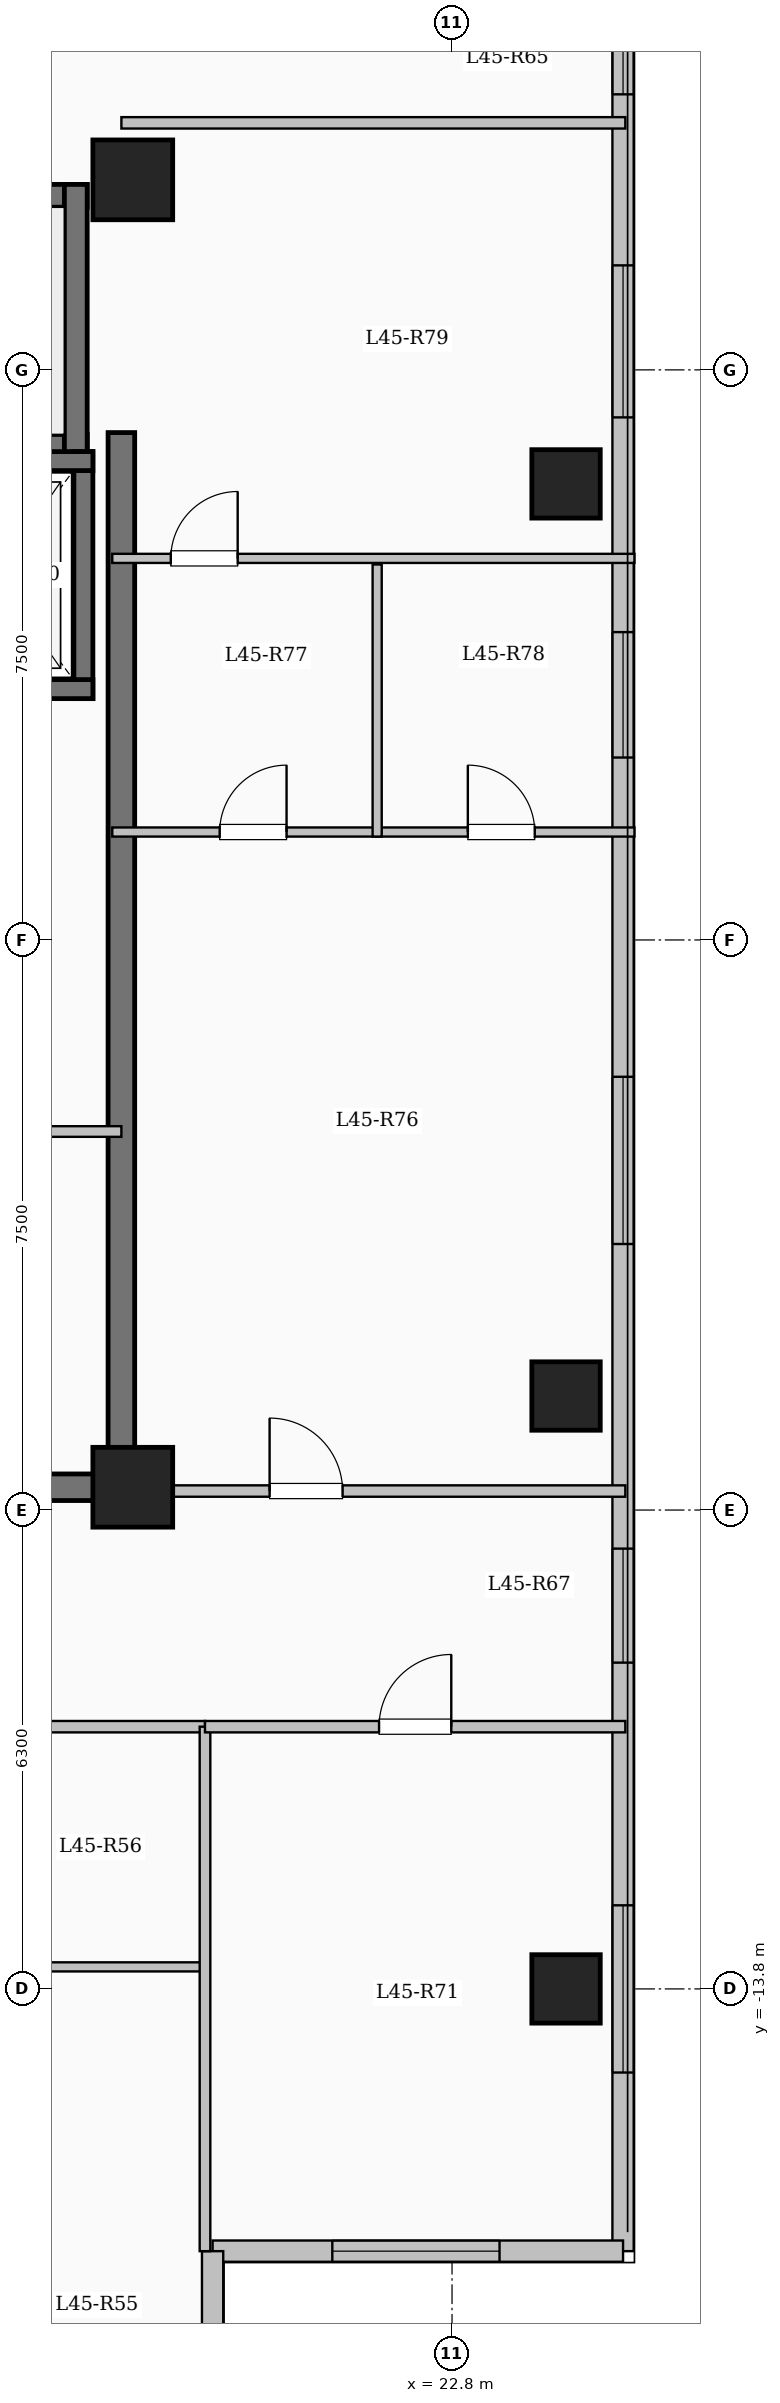
"""IFC4 building model, lengths in metres.
Left out: names, types, materials, properties, quantities, classifications, styles, units other than length and angle.
Written with IfcOpenShell. Run it as: python <this file> out.ifc"""

import sys

from ifc_helpers import new_model, si_unit, direction, frame, frame_2d, origin, origin_2d, place, context, subcontext, project, spatial, rectangle, extrude, element, fill, save


model = new_model("IFC4")
c1 = context("Model", 3, precision=1e-05, world=origin(), true_north=direction((0.0, 1.0)))
c2 = subcontext(c1, "Body", "Model", "MODEL_VIEW")
j1 = project(units=[si_unit("LENGTHUNIT", "METRE"), si_unit("PLANEANGLEUNIT", "RADIAN")], contexts=[c1])
p1 = place(None, origin())
s1 = spatial("IfcSite", under=j1, at=p1, CompositionType="ELEMENT")
p2 = place(p1, origin())
s2 = spatial("IfcBuilding", under=s1, at=p2, CompositionType="ELEMENT")
p3 = place(p2, frame((0.0, 0.0, 166.1)))
s3 = spatial("IfcBuildingStorey", under=s2, at=p3, CompositionType="ELEMENT", Elevation=166.1)
for number, where, z_axis, x_axis in (
    (1, (18.6, -7.2, 0.0), (0.0, 0.0, 1.0), (1.0, 0.0, 0.0)),
    (2, (18.6, 10.0, 0.0), (0.0, 0.0, 1.0), (1.0, 0.0, 0.0)),
):
    element("IfcColumn", number, at=place(p3, frame(where, z_axis=z_axis, x_axis=x_axis)), inside=s3, PredefinedType="COLUMN", context=c2, shape_type="SweptSolid", body=[
        extrude(rectangle(XDim=1.05, YDim=1.05, at=origin_2d()), origin(), (0.0, 0.0, 1.0), 3.35),
    ])
for number, where, z_axis, x_axis in (
    (3, (24.3, -13.8, 0.0), (0.0, 0.0, 1.0), (1.0, 0.0, 0.0)),
    (4, (24.3, -6.0, 0.0), (0.0, 0.0, 1.0), (1.0, 0.0, 0.0)),
    (5, (24.3, 6.0, 0.0), (0.0, 0.0, 1.0), (1.0, 0.0, 0.0)),
):
    element("IfcColumn", number, at=place(p3, frame(where, z_axis=z_axis, x_axis=x_axis)), inside=s3, PredefinedType="COLUMN", context=c2, shape_type="SweptSolid", body=[
        extrude(rectangle(XDim=0.9, YDim=0.9, at=origin_2d()), origin(), (0.0, 0.0, 1.0), 3.35),
    ])
p4 = place(p3, frame((25.05, 17.25, 0.0), z_axis=(0.0, 0.0, 1.0), x_axis=(0.0, -1.0, 0.0)))
e6 = element("IfcWall", 6, at=p4, inside=s3, PredefinedType="SOLIDWALL", context=c2, shape_type="SweptSolid", body=[
    extrude(rectangle(XDim=34.5, YDim=0.28, at=frame_2d((17.25, 0.0))), origin(), (0.0, 0.0, 1.0), 3.1),
])
p5 = place(p4, frame((1.375, 0.0, 0.9)))
e7 = element("IfcOpeningElement", 7, at=p5, cuts=e6, PredefinedType="OPENING", context=c2, shape_type="SweptSolid", body=[
    extrude(rectangle(XDim=2.0, YDim=1.7, at=frame_2d((1.0, 0.85))), frame((0.0, 0.15, 0.0), z_axis=(0.0, -1.0, 0.0), x_axis=(1.0, 0.0, 0.0)), (0.0, 0.0, 1.0), 0.3),
])
p6 = place(p4, frame((5.125, 0.0, 0.95)))
e8 = element("IfcOpeningElement", 8, at=p6, cuts=e6, PredefinedType="OPENING", context=c2, shape_type="SweptSolid", body=[
    extrude(rectangle(XDim=1.0, YDim=1.5, at=frame_2d((0.5, 0.75))), frame((0.0, 0.15, 0.0), z_axis=(0.0, -1.0, 0.0), x_axis=(1.0, 0.0, 0.0)), (0.0, 0.0, 1.0), 0.3),
])
p7 = place(p4, frame((8.375, 0.0, 0.9)))
e9 = element("IfcOpeningElement", 9, at=p7, cuts=e6, PredefinedType="OPENING", context=c2, shape_type="SweptSolid", body=[
    extrude(rectangle(XDim=2.0, YDim=1.7, at=frame_2d((1.0, 0.85))), frame((0.0, 0.15, 0.0), z_axis=(0.0, -1.0, 0.0), x_axis=(1.0, 0.0, 0.0)), (0.0, 0.0, 1.0), 0.3),
])
p8 = place(p4, frame((13.2, 0.0, 0.9)))
e10 = element("IfcOpeningElement", 10, at=p8, cuts=e6, PredefinedType="OPENING", context=c2, shape_type="SweptSolid", body=[
    extrude(rectangle(XDim=1.65, YDim=1.6, at=frame_2d((0.825, 0.8))), frame((0.0, 0.15, 0.0), z_axis=(0.0, -1.0, 0.0), x_axis=(1.0, 0.0, 0.0)), (0.0, 0.0, 1.0), 0.3),
])
p9 = place(p4, frame((19.05, 0.0, 0.9)))
e11 = element("IfcOpeningElement", 11, at=p9, cuts=e6, PredefinedType="OPENING", context=c2, shape_type="SweptSolid", body=[
    extrude(rectangle(XDim=2.2, YDim=1.75, at=frame_2d((1.1, 0.875))), frame((0.0, 0.15, 0.0), z_axis=(0.0, -1.0, 0.0), x_axis=(1.0, 0.0, 0.0)), (0.0, 0.0, 1.0), 0.3),
])
p10 = place(p4, frame((25.258, 0.0, 0.9)))
e12 = element("IfcOpeningElement", 12, at=p10, cuts=e6, PredefinedType="OPENING", context=c2, shape_type="SweptSolid", body=[
    extrude(rectangle(XDim=1.5, YDim=1.65, at=frame_2d((0.75, 0.825))), frame((0.0, 0.15, 0.0), z_axis=(0.0, -1.0, 0.0), x_axis=(1.0, 0.0, 0.0)), (0.0, 0.0, 1.0), 0.3),
])
p11 = place(p4, frame((29.95, 0.0, 0.9)))
e13 = element("IfcOpeningElement", 13, at=p11, cuts=e6, PredefinedType="OPENING", context=c2, shape_type="SweptSolid", body=[
    extrude(rectangle(XDim=2.2, YDim=1.75, at=frame_2d((1.1, 0.875))), frame((0.0, 0.15, 0.0), z_axis=(0.0, -1.0, 0.0), x_axis=(1.0, 0.0, 0.0)), (0.0, 0.0, 1.0), 0.3),
])
p12 = place(p3, frame((25.05, -17.25, 0.0), z_axis=(0.0, 0.0, 1.0), x_axis=(-1.0, 0.0, 0.0)))
e14 = element("IfcWall", 14, at=p12, inside=s3, PredefinedType="SOLIDWALL", context=c2, shape_type="SweptSolid", body=[
    extrude(rectangle(XDim=5.4, YDim=0.28, at=frame_2d((2.7, 0.0))), origin(), (0.0, 0.0, 1.0), 3.1),
])
p13 = place(p12, frame((1.625, 0.0, 0.9)))
e15 = element("IfcOpeningElement", 15, at=p13, cuts=e14, PredefinedType="OPENING", context=c2, shape_type="SweptSolid", body=[
    extrude(rectangle(XDim=2.2, YDim=1.75, at=frame_2d((1.1, 0.875))), frame((0.0, 0.15, 0.0), z_axis=(0.0, -1.0, 0.0), x_axis=(1.0, 0.0, 0.0)), (0.0, 0.0, 1.0), 0.3),
])
p14 = place(p3, frame((19.65, -17.25, 0.0), z_axis=(0.0, 0.0, 1.0), x_axis=(0.0, -1.0, 0.0)))
e16 = element("IfcWall", 16, at=p14, inside=s3, PredefinedType="SOLIDWALL", context=c2, shape_type="SweptSolid", body=[
    extrude(rectangle(XDim=3.9, YDim=0.28, at=frame_2d((1.95, 0.0))), origin(), (0.0, 0.0, 1.0), 3.1),
])
p15 = place(p14, frame((1.107, 0.0, 0.9)))
e17 = element("IfcOpeningElement", 17, at=p15, cuts=e16, PredefinedType="OPENING", context=c2, shape_type="SweptSolid", body=[
    extrude(rectangle(XDim=1.65, YDim=1.6, at=frame_2d((0.825, 0.8))), frame((0.0, 0.15, 0.0), z_axis=(0.0, -1.0, 0.0), x_axis=(1.0, 0.0, 0.0)), (0.0, 0.0, 1.0), 0.3),
])
p16 = place(p3, frame((10.0, 9.79, 0.0), z_axis=(0.0, 0.0, 1.0), x_axis=(1.0, 0.0, 0.0)))
e18 = element("IfcWall", 18, at=p16, inside=s3, PredefinedType="SHEAR", context=c2, shape_type="SweptSolid", body=[
    extrude(rectangle(XDim=8.0, YDim=0.3, at=frame_2d((4.0, 0.0))), origin(), (0.0, 0.0, 1.0), 3.35),
])
p17 = place(p3, frame((10.0, 6.5, 0.0), z_axis=(0.0, 0.0, 1.0), x_axis=(1.0, 0.0, 0.0)))
e19 = element("IfcWall", 19, at=p17, inside=s3, PredefinedType="SHEAR", context=c2, shape_type="SweptSolid", body=[
    extrude(rectangle(XDim=8.0, YDim=0.3, at=frame_2d((4.0, 0.0))), origin(), (0.0, 0.0, 1.0), 3.35),
])
p18 = place(p17, frame((0.55, 0.0, 0.0)))
e20 = element("IfcOpeningElement", 20, at=p18, cuts=e19, PredefinedType="OPENING", context=c2, shape_type="SweptSolid", body=[
    extrude(rectangle(XDim=1.0, YDim=2.15, at=frame_2d((0.5, 1.075))), frame((0.0, 0.16, 0.0), z_axis=(0.0, -1.0, 0.0), x_axis=(1.0, 0.0, 0.0)), (0.0, 0.0, 1.0), 0.32),
])
p19 = place(p3, frame((17.85, 6.35, 0.0), z_axis=(0.0, 0.0, 1.0), x_axis=(0.0, 1.0, 0.0)))
e21 = element("IfcWall", 21, at=p19, inside=s3, PredefinedType="SHEAR", context=c2, shape_type="SweptSolid", body=[
    extrude(rectangle(XDim=3.59, YDim=0.3, at=frame_2d((1.795, 0.0))), origin(), (0.0, 0.0, 1.0), 3.35),
])
p20 = place(p3, frame((17.95, 3.175, 0.0), z_axis=(0.0, 0.0, 1.0), x_axis=(0.0, 1.0, 0.0)))
e22 = element("IfcWall", 22, at=p20, inside=s3, PredefinedType="SHEAR", context=c2, shape_type="SweptSolid", body=[
    extrude(rectangle(XDim=3.25, YDim=0.25, at=frame_2d((1.625, 0.0))), origin(), (0.0, 0.0, 1.0), 3.35),
])
for number, where, z_axis, x_axis in (
    (23, (15.525, 3.3, 0.0), (0.0, 0.0, 1.0), (1.0, 0.0, 0.0)),
    (24, (15.525, 6.3, 0.0), (0.0, 0.0, 1.0), (1.0, 0.0, 0.0)),
):
    element("IfcWall", number, at=place(p3, frame(where, z_axis=z_axis, x_axis=x_axis)), inside=s3, PredefinedType="SHEAR", context=c2, shape_type="SweptSolid", body=[
        extrude(rectangle(XDim=2.55, YDim=0.25, at=frame_2d((1.275, 0.0))), origin(), (0.0, 0.0, 1.0), 3.35),
    ])
p21 = place(p3, frame((18.45, -7.375, 0.0), z_axis=(0.0, 0.0, 1.0), x_axis=(0.0, 1.0, 0.0)))
e25 = element("IfcWall", 25, at=p21, inside=s3, PredefinedType="SHEAR", context=c2, shape_type="SweptSolid", body=[
    extrude(rectangle(XDim=14.05, YDim=0.35, at=frame_2d((7.025, 0.0))), origin(), (0.0, 0.0, 1.0), 3.35),
])
p22 = place(p3, frame((10.075, -7.2, 0.0), z_axis=(0.0, 0.0, 1.0), x_axis=(1.0, 0.0, 0.0)))
e26 = element("IfcWall", 26, at=p22, inside=s3, PredefinedType="SHEAR", context=c2, shape_type="SweptSolid", body=[
    extrude(rectangle(XDim=8.55, YDim=0.35, at=frame_2d((4.275, 0.0))), origin(), (0.0, 0.0, 1.0), 3.35),
])
p23 = place(p3, frame((15.4, -2.52, 0.0), z_axis=(0.0, 0.0, 1.0), x_axis=(1.0, 0.0, 0.0)))
e27 = element("IfcWall", 27, at=p23, inside=s3, PredefinedType="PARTITIONING", context=c2, shape_type="SweptSolid", body=[
    extrude(rectangle(XDim=3.05, YDim=0.14, at=frame_2d((1.525, 0.0))), origin(), (0.0, 0.0, 1.0), 3.1),
])
p24 = place(p23, frame((1.05, 0.0, 0.0)))
e28 = element("IfcOpeningElement", 28, at=p24, cuts=e27, PredefinedType="OPENING", context=c2, shape_type="SweptSolid", body=[
    extrude(rectangle(XDim=0.9, YDim=2.08, at=frame_2d((0.45, 1.04))), frame((0.0, 0.08, 0.0), z_axis=(0.0, -1.0, 0.0), x_axis=(1.0, 0.0, 0.0)), (0.0, 0.0, 1.0), 0.16),
])
p25 = place(p3, frame((8.55, -10.35, 0.0), z_axis=(0.0, 0.0, 1.0), x_axis=(1.0, 0.0, 0.0)))
e29 = element("IfcWall", 29, at=p25, inside=s3, PredefinedType="PARTITIONING", context=c2, shape_type="SweptSolid", body=[
    extrude(rectangle(XDim=11.0, YDim=0.15, at=frame_2d((5.5, 0.0))), origin(), (0.0, 0.0, 1.0), 3.1),
])
p26 = place(p25, frame((0.75, 0.0, 0.0)))
e30 = element("IfcOpeningElement", 30, at=p26, cuts=e29, PredefinedType="OPENING", context=c2, shape_type="SweptSolid", body=[
    extrude(rectangle(XDim=0.96, YDim=2.15, at=frame_2d((0.48, 1.075))), frame((0.0, 0.085, 0.0), z_axis=(0.0, -1.0, 0.0), x_axis=(1.0, 0.0, 0.0)), (0.0, 0.0, 1.0), 0.17),
])
p27 = place(p25, frame((5.787, 0.0, 0.0)))
e31 = element("IfcOpeningElement", 31, at=p27, cuts=e29, PredefinedType="OPENING", context=c2, shape_type="SweptSolid", body=[
    extrude(rectangle(XDim=0.96, YDim=2.15, at=frame_2d((0.48, 1.075))), frame((0.0, 0.085, 0.0), z_axis=(0.0, -1.0, 0.0), x_axis=(1.0, 0.0, 0.0)), (0.0, 0.0, 1.0), 0.17),
])
p28 = place(p3, frame((16.649, -13.51, 0.0), z_axis=(0.0, 0.0, 1.0), x_axis=(1.0, 0.0, 0.0)))
e32 = element("IfcWall", 32, at=p28, inside=s3, PredefinedType="PARTITIONING", context=c2, shape_type="SweptSolid", body=[
    extrude(rectangle(XDim=2.961, YDim=0.12, at=frame_2d((1.48, 0.0))), origin(), (0.0, 0.0, 1.0), 3.1),
])
p29 = place(p3, frame((18.45, -7.25, 0.0), z_axis=(0.0, 0.0, 1.0), x_axis=(1.0, 0.0, 0.0)))
e33 = element("IfcWall", 33, at=p29, inside=s3, PredefinedType="PARTITIONING", context=c2, shape_type="SweptSolid", body=[
    extrude(rectangle(XDim=6.63, YDim=0.15, at=frame_2d((3.315, 0.0))), origin(), (0.0, 0.0, 1.0), 3.1),
])
p30 = place(p29, frame((1.95, 0.0, 0.0)))
e34 = element("IfcOpeningElement", 34, at=p30, cuts=e33, PredefinedType="OPENING", context=c2, shape_type="SweptSolid", body=[
    extrude(rectangle(XDim=0.96, YDim=2.15, at=frame_2d((0.48, 1.075))), frame((0.0, 0.085, 0.0), z_axis=(0.0, -1.0, 0.0), x_axis=(1.0, 0.0, 0.0)), (0.0, 0.0, 1.0), 0.17),
])
p31 = place(p3, frame((18.45, 10.75, 0.0), z_axis=(0.0, 0.0, 1.0), x_axis=(1.0, 0.0, 0.0)))
e35 = element("IfcWall", 35, at=p31, inside=s3, PredefinedType="PARTITIONING", context=c2, shape_type="SweptSolid", body=[
    extrude(rectangle(XDim=6.63, YDim=0.15, at=frame_2d((3.315, 0.0))), origin(), (0.0, 0.0, 1.0), 3.1),
])
p32 = place(p3, frame((19.55, -17.25, 0.0), z_axis=(0.0, 0.0, 1.0), x_axis=(0.0, 1.0, 0.0)))
e36 = element("IfcWall", 36, at=p32, inside=s3, PredefinedType="PARTITIONING", context=c2, shape_type="SweptSolid", body=[
    extrude(rectangle(XDim=6.9, YDim=0.14, at=frame_2d((3.45, 0.0))), origin(), (0.0, 0.0, 1.0), 3.1),
])
p33 = place(p3, frame((19.55, -10.35, 0.0), z_axis=(0.0, 0.0, 1.0), x_axis=(1.0, 0.0, 0.0)))
e37 = element("IfcWall", 37, at=p33, inside=s3, PredefinedType="PARTITIONING", context=c2, shape_type="SweptSolid", body=[
    extrude(rectangle(XDim=5.53, YDim=0.15, at=frame_2d((2.765, 0.0))), origin(), (0.0, 0.0, 1.0), 3.1),
])
p34 = place(p33, frame((2.29, 0.0, 0.0)))
e38 = element("IfcOpeningElement", 38, at=p34, cuts=e37, PredefinedType="OPENING", context=c2, shape_type="SweptSolid", body=[
    extrude(rectangle(XDim=0.95, YDim=2.15, at=frame_2d((0.475, 1.075))), frame((0.0, 0.085, 0.0), z_axis=(0.0, -1.0, 0.0), x_axis=(1.0, 0.0, 0.0)), (0.0, 0.0, 1.0), 0.17),
])
p35 = place(p3, frame((18.33, 1.42, 0.0), z_axis=(0.0, 0.0, 1.0), x_axis=(1.0, 0.0, 0.0)))
e39 = element("IfcWall", 39, at=p35, inside=s3, PredefinedType="PARTITIONING", context=c2, shape_type="SweptSolid", body=[
    extrude(rectangle(XDim=6.87, YDim=0.12, at=frame_2d((3.435, 0.0))), origin(), (0.0, 0.0, 1.0), 3.1),
])
p36 = place(p35, frame((1.413, 0.0, 0.0)))
e40 = element("IfcOpeningElement", 40, at=p36, cuts=e39, PredefinedType="OPENING", context=c2, shape_type="SweptSolid", body=[
    extrude(rectangle(XDim=0.88, YDim=2.1, at=frame_2d((0.44, 1.05))), frame((0.0, 0.07, 0.0), z_axis=(0.0, -1.0, 0.0), x_axis=(1.0, 0.0, 0.0)), (0.0, 0.0, 1.0), 0.14),
])
p37 = place(p35, frame((4.678, 0.0, 0.0)))
e41 = element("IfcOpeningElement", 41, at=p37, cuts=e39, PredefinedType="OPENING", context=c2, shape_type="SweptSolid", body=[
    extrude(rectangle(XDim=0.88, YDim=2.1, at=frame_2d((0.44, 1.05))), frame((0.0, 0.07, 0.0), z_axis=(0.0, -1.0, 0.0), x_axis=(1.0, 0.0, 0.0)), (0.0, 0.0, 1.0), 0.14),
])
p38 = place(p3, frame((18.33, 5.02, 0.0), z_axis=(0.0, 0.0, 1.0), x_axis=(1.0, 0.0, 0.0)))
e42 = element("IfcWall", 42, at=p38, inside=s3, PredefinedType="PARTITIONING", context=c2, shape_type="SweptSolid", body=[
    extrude(rectangle(XDim=6.87, YDim=0.12, at=frame_2d((3.435, 0.0))), origin(), (0.0, 0.0, 1.0), 3.1),
])
p39 = place(p38, frame((0.77, 0.0, 0.0)))
e43 = element("IfcOpeningElement", 43, at=p39, cuts=e42, PredefinedType="OPENING", context=c2, shape_type="SweptSolid", body=[
    extrude(rectangle(XDim=0.88, YDim=2.1, at=frame_2d((0.44, 1.05))), frame((0.0, 0.07, 0.0), z_axis=(0.0, -1.0, 0.0), x_axis=(1.0, 0.0, 0.0)), (0.0, 0.0, 1.0), 0.14),
])
p40 = place(p3, frame((21.815, 1.36, 0.0), z_axis=(0.0, 0.0, 1.0), x_axis=(0.0, 1.0, 0.0)))
e44 = element("IfcWall", 44, at=p40, inside=s3, PredefinedType="PARTITIONING", context=c2, shape_type="SweptSolid", body=[
    extrude(rectangle(XDim=3.58, YDim=0.12, at=frame_2d((1.79, 0.0))), origin(), (0.0, 0.0, 1.0), 3.1),
])
p41 = place(p6, origin())
e45 = element("IfcWindow", 45, at=p41, inside=s3, PartitioningType="SINGLE_PANEL", PredefinedType="WINDOW", context=c2, shape_type="SweptSolid", body=[
    extrude(rectangle(XDim=1.0, YDim=1.5, at=frame_2d((0.5, 0.75))), frame((0.0, 0.03, 0.0), z_axis=(0.0, -1.0, 0.0), x_axis=(1.0, 0.0, 0.0)), (0.0, 0.0, 1.0), 0.06),
])
fill(e8, e45)
p42 = place(p7, origin())
e46 = element("IfcWindow", 46, at=p42, inside=s3, PartitioningType="SINGLE_PANEL", PredefinedType="WINDOW", context=c2, shape_type="SweptSolid", body=[
    extrude(rectangle(XDim=2.0, YDim=1.7, at=frame_2d((1.0, 0.85))), frame((0.0, 0.03, 0.0), z_axis=(0.0, -1.0, 0.0), x_axis=(1.0, 0.0, 0.0)), (0.0, 0.0, 1.0), 0.06),
])
fill(e9, e46)
p43 = place(p8, origin())
e47 = element("IfcWindow", 47, at=p43, inside=s3, PartitioningType="SINGLE_PANEL", PredefinedType="WINDOW", context=c2, shape_type="SweptSolid", body=[
    extrude(rectangle(XDim=1.65, YDim=1.6, at=frame_2d((0.825, 0.8))), frame((0.0, 0.03, 0.0), z_axis=(0.0, -1.0, 0.0), x_axis=(1.0, 0.0, 0.0)), (0.0, 0.0, 1.0), 0.06),
])
fill(e10, e47)
p44 = place(p9, origin())
e48 = element("IfcWindow", 48, at=p44, inside=s3, PartitioningType="SINGLE_PANEL", PredefinedType="WINDOW", context=c2, shape_type="SweptSolid", body=[
    extrude(rectangle(XDim=2.2, YDim=1.75, at=frame_2d((1.1, 0.875))), frame((0.0, 0.03, 0.0), z_axis=(0.0, -1.0, 0.0), x_axis=(1.0, 0.0, 0.0)), (0.0, 0.0, 1.0), 0.06),
])
fill(e11, e48)
p45 = place(p10, origin())
e49 = element("IfcWindow", 49, at=p45, inside=s3, PartitioningType="SINGLE_PANEL", PredefinedType="WINDOW", context=c2, shape_type="SweptSolid", body=[
    extrude(rectangle(XDim=1.5, YDim=1.65, at=frame_2d((0.75, 0.825))), frame((0.0, 0.03, 0.0), z_axis=(0.0, -1.0, 0.0), x_axis=(1.0, 0.0, 0.0)), (0.0, 0.0, 1.0), 0.06),
])
fill(e12, e49)
p46 = place(p11, origin())
e50 = element("IfcWindow", 50, at=p46, inside=s3, PartitioningType="SINGLE_PANEL", PredefinedType="WINDOW", context=c2, shape_type="SweptSolid", body=[
    extrude(rectangle(XDim=2.2, YDim=1.75, at=frame_2d((1.1, 0.875))), frame((0.0, 0.03, 0.0), z_axis=(0.0, -1.0, 0.0), x_axis=(1.0, 0.0, 0.0)), (0.0, 0.0, 1.0), 0.06),
])
fill(e13, e50)
p47 = place(p13, origin())
e51 = element("IfcWindow", 51, at=p47, inside=s3, PartitioningType="SINGLE_PANEL", PredefinedType="WINDOW", context=c2, shape_type="SweptSolid", body=[
    extrude(rectangle(XDim=2.2, YDim=1.75, at=frame_2d((1.1, 0.875))), frame((0.0, 0.03, 0.0), z_axis=(0.0, -1.0, 0.0), x_axis=(1.0, 0.0, 0.0)), (0.0, 0.0, 1.0), 0.06),
])
fill(e15, e51)
p48 = place(p34, origin())
e52 = element("IfcDoor", 52, at=p48, inside=s3, OperationType="SINGLE_SWING_RIGHT", PredefinedType="DOOR", context=c2, shape_type="SweptSolid", body=[
    extrude(rectangle(XDim=0.95, YDim=2.15, at=frame_2d((0.475, 1.075))), frame((0.0, 0.025, 0.0), z_axis=(0.0, -1.0, 0.0), x_axis=(1.0, 0.0, 0.0)), (0.0, 0.0, 1.0), 0.05),
])
fill(e38, e52)
p49 = place(p30, origin())
e53 = element("IfcDoor", 53, at=p49, inside=s3, OperationType="SINGLE_SWING_LEFT", PredefinedType="DOOR", context=c2, shape_type="SweptSolid", body=[
    extrude(rectangle(XDim=0.96, YDim=2.15, at=frame_2d((0.48, 1.075))), frame((0.0, 0.025, 0.0), z_axis=(0.0, -1.0, 0.0), x_axis=(1.0, 0.0, 0.0)), (0.0, 0.0, 1.0), 0.05),
])
fill(e34, e53)
p50 = place(p36, origin())
e54 = element("IfcDoor", 54, at=p50, inside=s3, OperationType="SINGLE_SWING_RIGHT", PredefinedType="DOOR", context=c2, shape_type="SweptSolid", body=[
    extrude(rectangle(XDim=0.88, YDim=2.1, at=frame_2d((0.44, 1.05))), frame((0.0, 0.025, 0.0), z_axis=(0.0, -1.0, 0.0), x_axis=(1.0, 0.0, 0.0)), (0.0, 0.0, 1.0), 0.05),
])
fill(e40, e54)
p51 = place(p37, origin())
e55 = element("IfcDoor", 55, at=p51, inside=s3, OperationType="SINGLE_SWING_LEFT", PredefinedType="DOOR", context=c2, shape_type="SweptSolid", body=[
    extrude(rectangle(XDim=0.88, YDim=2.1, at=frame_2d((0.44, 1.05))), frame((0.0, 0.025, 0.0), z_axis=(0.0, -1.0, 0.0), x_axis=(1.0, 0.0, 0.0)), (0.0, 0.0, 1.0), 0.05),
])
fill(e41, e55)
p52 = place(p39, origin())
e56 = element("IfcDoor", 56, at=p52, inside=s3, OperationType="SINGLE_SWING_RIGHT", PredefinedType="DOOR", context=c2, shape_type="SweptSolid", body=[
    extrude(rectangle(XDim=0.88, YDim=2.1, at=frame_2d((0.44, 1.05))), frame((0.0, 0.025, 0.0), z_axis=(0.0, -1.0, 0.0), x_axis=(1.0, 0.0, 0.0)), (0.0, 0.0, 1.0), 0.05),
])
fill(e43, e56)
save(model, sys.argv[1])
